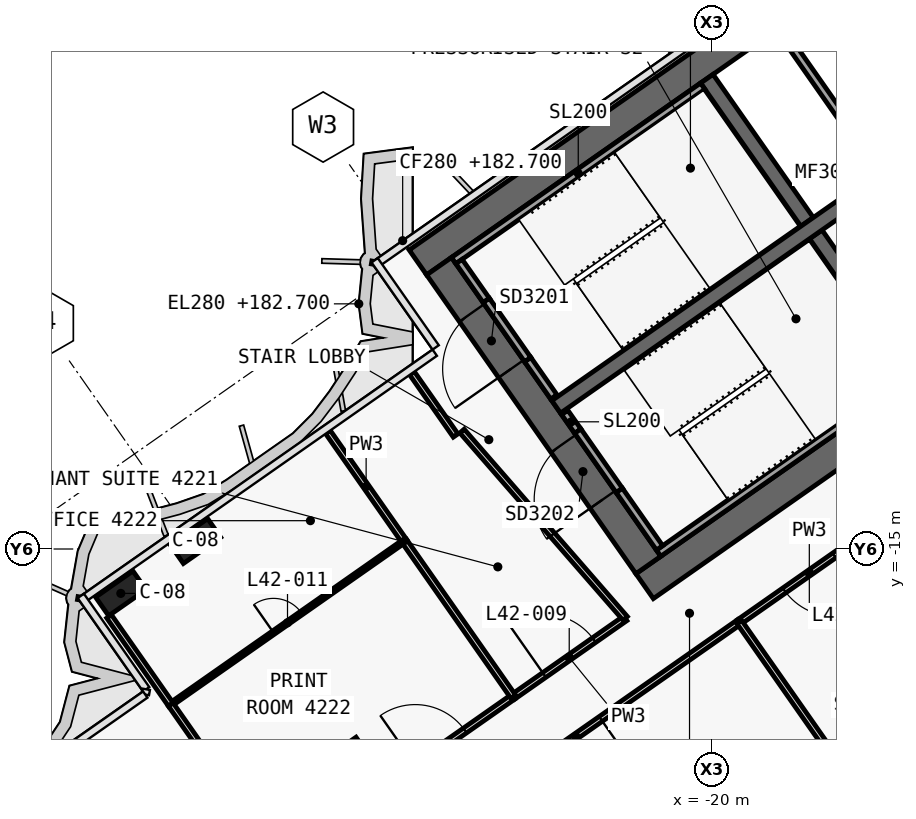
"""IFC4 building model, lengths in metres.
Left out: names, types, materials, properties, quantities, classifications, styles, units other than length and angle.
Written with IfcOpenShell. Run it as: python <this file> out.ifc"""

import sys

from ifc_helpers import new_model, si_unit, direction, frame, frame_2d, origin, origin_2d, place, context, subcontext, project, spatial, polyline, rectangle, outline, extrude, element, fill, save


model = new_model("IFC4")
c1 = context("Model", 3, precision=1e-05, world=origin(), true_north=direction((0.0, 1.0)))
c2 = subcontext(c1, "Body", "Model", "MODEL_VIEW")
j1 = project(units=[si_unit("LENGTHUNIT", "METRE"), si_unit("PLANEANGLEUNIT", "RADIAN")], contexts=[c1])
p1 = place(None, origin())
s1 = spatial("IfcSite", under=j1, at=p1, CompositionType="ELEMENT")
p2 = place(p1, origin())
s2 = spatial("IfcBuilding", under=s1, at=p2, CompositionType="ELEMENT")
p3 = place(p2, frame((0.0, 0.0, 182.7)))
s3 = spatial("IfcBuildingStorey", under=s2, at=p3, CompositionType="ELEMENT", Elevation=182.7)
p4 = place(p3, frame((0.029, 11.984, 0.0), z_axis=(0.0, 0.0, 1.0), x_axis=(-0.819151382952, -0.573577380837, 0.0)))
e1 = element("IfcWall", 1, at=p4, inside=s3, PredefinedType="SHEAR", context=c2, shape_type="SweptSolid", body=[
    extrude(outline(polyline([(33.898, 0.4), (0.56, 0.4), (-0.0, -0.4), (33.898, -0.4), (33.898, 0.4)])), origin(), (0.0, 0.0, 1.0), 3.9),
])
p5 = place(p3, frame((0.029, -0.712, 0.0), z_axis=(0.0, 0.0, 1.0), x_axis=(-0.819151758019, -0.573576845187, 0.0)))
e2 = element("IfcWall", 2, at=p5, inside=s3, PredefinedType="SHEAR", context=c2, shape_type="SweptSolid", body=[
    extrude(outline(polyline([(26.616, 0.4), (0.56, 0.4), (-0.0, -0.4), (26.616, -0.4), (26.616, 0.4)])), origin(), (0.0, 0.0, 1.0), 3.9),
])
p6 = place(p5, frame((2.966, 0.0, 0.0)))
e3 = element("IfcOpeningElement", 3, at=p6, cuts=e2, PredefinedType="OPENING", context=c2, shape_type="SweptSolid", body=[
    extrude(rectangle(XDim=2.4, YDim=2.1, at=frame_2d((1.2, 1.05))), frame((0.0, 0.41, 0.0), z_axis=(0.0, -1.0, 0.0), x_axis=(1.0, 0.0, 0.0)), (0.0, 0.0, 1.0), 0.82),
])
p7 = place(p5, frame((11.916, 0.0, 0.0)))
e4 = element("IfcOpeningElement", 4, at=p7, cuts=e2, PredefinedType="OPENING", context=c2, shape_type="SweptSolid", body=[
    extrude(rectangle(XDim=2.4, YDim=2.1, at=frame_2d((1.2, 1.05))), frame((0.0, 0.41, 0.0), z_axis=(0.0, -1.0, 0.0), x_axis=(1.0, 0.0, 0.0)), (0.0, 0.0, 1.0), 0.82),
])
p8 = place(p3, frame((-21.675, -15.421, 0.0), z_axis=(0.0, 0.0, 1.0), x_axis=(-0.573581815061, 0.819148278049, 0.0)))
e5 = element("IfcWall", 5, at=p8, inside=s3, PredefinedType="SHEAR", context=c2, shape_type="SweptSolid", body=[
    extrude(outline(polyline([(0.0, 0.4), (0.0, -0.4), (9.6, -0.4), (9.6, 0.4), (0.0, 0.4)])), origin(), (0.0, 0.0, 1.0), 3.9),
])
p9 = place(p8, frame((6.3, 0.0, 0.0)))
e6 = element("IfcOpeningElement", 6, at=p9, cuts=e5, PredefinedType="OPENING", context=c2, shape_type="SweptSolid", body=[
    extrude(rectangle(XDim=1.8, YDim=2.1, at=frame_2d((0.9, 1.05))), frame((0.0, 0.41, 0.0), z_axis=(0.0, -1.0, 0.0), x_axis=(1.0, 0.0, 0.0)), (0.0, 0.0, 1.0), 0.82),
])
p10 = place(p8, frame((2.1, 0.0, 0.0)))
e7 = element("IfcOpeningElement", 7, at=p10, cuts=e5, PredefinedType="OPENING", context=c2, shape_type="SweptSolid", body=[
    extrude(rectangle(XDim=1.8, YDim=2.1, at=frame_2d((0.9, 1.05))), frame((0.0, 0.41, 0.0), z_axis=(0.0, -1.0, 0.0), x_axis=(1.0, 0.0, 0.0)), (0.0, 0.0, 1.0), 0.82),
])
p11 = place(p3, frame((-14.63, -10.488, 0.0), z_axis=(0.0, 0.0, 1.0), x_axis=(-0.573611936273, 0.819127185829, 0.0)))
e8 = element("IfcWall", 8, at=p11, inside=s3, PredefinedType="SHEAR", context=c2, shape_type="SweptSolid", body=[
    extrude(outline(polyline([(4.6, 0.2), (0.0, 0.2), (0.0, -0.2), (4.6, -0.2), (4.6, 0.2)])), origin(), (0.0, 0.0, 1.0), 3.9),
])
p12 = place(p3, frame((-17.498, -6.392, 0.0), z_axis=(0.0, 0.0, 1.0), x_axis=(-0.573611936273, 0.819127185829, 0.0)))
e9 = element("IfcWall", 9, at=p12, inside=s3, PredefinedType="SHEAR", context=c2, shape_type="SweptSolid", body=[
    extrude(outline(polyline([(4.6, -0.2), (4.6, 0.2), (0.0, 0.2), (0.0, -0.2), (4.6, -0.2)])), origin(), (0.0, 0.0, 1.0), 3.9),
])
p13 = place(p3, frame((-2.638, 3.768, 0.0), z_axis=(0.0, 0.0, 1.0), x_axis=(-0.81915267502, -0.573575535572, 0.0)))
e10 = element("IfcWall", 10, at=p13, inside=s3, PredefinedType="SHEAR", context=c2, shape_type="SweptSolid", body=[
    extrude(outline(polyline([(26.2, 0.2), (0.0, 0.2), (0.0, -0.2), (26.2, -0.2), (26.2, 0.2)])), origin(), (0.0, 0.0, 1.0), 3.9),
])
p14 = place(p13, frame((1.169, 0.0, 0.0)))
e11 = element("IfcOpeningElement", 11, at=p14, cuts=e10, PredefinedType="OPENING", context=c2, shape_type="SweptSolid", body=[
    extrude(rectangle(XDim=1.1, YDim=2.1, at=frame_2d((0.55, 1.05))), frame((0.0, 0.21, 0.0), z_axis=(0.0, -1.0, 0.0), x_axis=(1.0, 0.0, 0.0)), (0.0, 0.0, 1.0), 0.42),
])
p15 = place(p13, frame((3.206, 0.0, 0.0)))
e12 = element("IfcOpeningElement", 12, at=p15, cuts=e10, PredefinedType="OPENING", context=c2, shape_type="SweptSolid", body=[
    extrude(rectangle(XDim=1.1, YDim=2.1, at=frame_2d((0.55, 1.05))), frame((0.0, 0.21, 0.0), z_axis=(0.0, -1.0, 0.0), x_axis=(1.0, 0.0, 0.0)), (0.0, 0.0, 1.0), 0.42),
])
p16 = place(p13, frame((5.244, 0.0, 0.0)))
e13 = element("IfcOpeningElement", 13, at=p16, cuts=e10, PredefinedType="OPENING", context=c2, shape_type="SweptSolid", body=[
    extrude(rectangle(XDim=1.1, YDim=2.1, at=frame_2d((0.55, 1.05))), frame((0.0, 0.21, 0.0), z_axis=(0.0, -1.0, 0.0), x_axis=(1.0, 0.0, 0.0)), (0.0, 0.0, 1.0), 0.42),
])
p17 = place(p13, frame((7.281, 0.0, 0.0)))
e14 = element("IfcOpeningElement", 14, at=p17, cuts=e10, PredefinedType="OPENING", context=c2, shape_type="SweptSolid", body=[
    extrude(rectangle(XDim=1.1, YDim=2.1, at=frame_2d((0.55, 1.05))), frame((0.0, 0.21, 0.0), z_axis=(0.0, -1.0, 0.0), x_axis=(1.0, 0.0, 0.0)), (0.0, 0.0, 1.0), 0.42),
])
p18 = place(p13, frame((9.688, 0.0, 0.0)))
e15 = element("IfcOpeningElement", 15, at=p18, cuts=e10, PredefinedType="OPENING", context=c2, shape_type="SweptSolid", body=[
    extrude(rectangle(XDim=1.1, YDim=2.1, at=frame_2d((0.55, 1.05))), frame((0.0, 0.21, 0.0), z_axis=(0.0, -1.0, 0.0), x_axis=(1.0, 0.0, 0.0)), (0.0, 0.0, 1.0), 0.42),
])
p19 = place(p13, frame((11.863, 0.0, 0.0)))
e16 = element("IfcOpeningElement", 16, at=p19, cuts=e10, PredefinedType="OPENING", context=c2, shape_type="SweptSolid", body=[
    extrude(rectangle(XDim=1.1, YDim=2.1, at=frame_2d((0.55, 1.05))), frame((0.0, 0.21, 0.0), z_axis=(0.0, -1.0, 0.0), x_axis=(1.0, 0.0, 0.0)), (0.0, 0.0, 1.0), 0.42),
])
for number, where, z_axis, x_axis in (
    (17, (-33.591, -14.792, 0.0), (0.0, 0.0, 1.0), (-0.819, -0.574, 0.0)),
    (18, (-35.556, -16.168, 0.0), (0.0, 0.0, 1.0), (-0.819, -0.574, 0.0)),
):
    element("IfcColumn", number, at=place(p3, frame(where, z_axis=z_axis, x_axis=x_axis)), inside=s3, PredefinedType="COLUMN", context=c2, shape_type="SweptSolid", body=[
        extrude(rectangle(XDim=1.2, YDim=0.6, at=origin_2d()), origin(), (0.0, 0.0, 1.0), 3.9),
    ])
p20 = place(p3, frame((-29.49, -20.649, 0.0), z_axis=(0.0, 0.0, 1.0), x_axis=(-0.819152044289, -0.573576436351, 0.0)))
e19 = element("IfcColumn", 19, at=p20, inside=s3, PredefinedType="COLUMN", context=c2, shape_type="SweptSolid", body=[
    extrude(rectangle(XDim=1.0, YDim=1.0, at=origin_2d()), origin(), (0.0, 0.0, 1.0), 3.9),
])
p21 = place(p3, frame((-15.594, -5.059, 0.0), z_axis=(0.0, 0.0, 1.0), x_axis=(-0.573540709186, 0.819177059558, 0.0)))
e20 = element("IfcWall", 20, at=p21, inside=s3, PredefinedType="SOLIDWALL", context=c2, shape_type="SweptSolid", body=[
    extrude(rectangle(XDim=4.6, YDim=0.2, at=frame_2d((2.3, 0.0))), origin(), (0.0, 0.0, 1.0), 3.62),
])
p22 = place(p3, frame((-20.243, -2.821, 0.0), z_axis=(0.0, 0.0, 1.0), x_axis=(-0.819141584393, -0.57359137434, 0.0)))
e21 = element("IfcWall", 21, at=p22, inside=s3, PredefinedType="SOLIDWALL", context=c2, shape_type="SweptSolid", body=[
    extrude(rectangle(XDim=8.0, YDim=0.2, at=frame_2d((4.0, 0.0))), origin(), (0.0, 0.0, 1.0), 3.62),
])
p23 = place(p3, frame((-24.162, -10.998, 0.0), z_axis=(0.0, 0.0, 1.0), x_axis=(-0.573612502218, 0.819126789514, 0.0)))
e22 = element("IfcWall", 22, at=p23, inside=s3, PredefinedType="SOLIDWALL", context=c2, shape_type="SweptSolid", body=[
    extrude(rectangle(XDim=1.2, YDim=0.2, at=frame_2d((0.6, 0.0))), origin(), (0.0, 0.0, 1.0), 3.62),
])
p24 = place(p3, frame((-25.94, -8.458, 0.0), z_axis=(0.0, 0.0, 1.0), x_axis=(-0.573619628835, 0.819121798889, 0.0)))
e23 = element("IfcWall", 23, at=p24, inside=s3, PredefinedType="SOLIDWALL", context=c2, shape_type="SweptSolid", body=[
    extrude(rectangle(XDim=1.25, YDim=0.2, at=frame_2d((0.625, 0.0))), origin(), (0.0, 0.0, 1.0), 3.62),
])
p25 = place(p3, frame((-24.85, -10.014, 2.15), z_axis=(0.0, 0.0, 1.0), x_axis=(-0.573505465124, 0.819201734296, 0.0)))
e24 = element("IfcWall", 24, at=p25, inside=s3, PredefinedType="SOLIDWALL", context=c2, shape_type="SweptSolid", body=[
    extrude(rectangle(XDim=1.9, YDim=0.2, at=frame_2d((0.95, 0.0))), origin(), (0.0, 0.0, 1.0), 1.47),
])
p26 = place(p3, frame((-14.851, -10.521, 0.0), z_axis=(0.0, 0.0, 1.0), x_axis=(-0.819141584393, -0.57359137434, 0.0)))
e25 = element("IfcWall", 25, at=p26, inside=s3, PredefinedType="SOLIDWALL", context=c2, shape_type="SweptSolid", body=[
    extrude(rectangle(XDim=8.0, YDim=0.2, at=frame_2d((4.0, 0.0))), origin(), (0.0, 0.0, 1.0), 3.62),
])
p27 = place(p3, frame((-21.38, -14.97, 0.0), z_axis=(0.0, 0.0, 1.0), x_axis=(-0.573559770908, 0.819163713305, 0.0)))
e26 = element("IfcWall", 26, at=p27, inside=s3, PredefinedType="SOLIDWALL", context=c2, shape_type="SweptSolid", body=[
    extrude(rectangle(XDim=1.85, YDim=0.2, at=frame_2d((0.925, 0.0))), origin(), (0.0, 0.0, 1.0), 3.62),
])
p28 = place(p3, frame((-23.531, -11.898, 0.0), z_axis=(0.0, 0.0, 1.0), x_axis=(-0.573708088123, 0.819059844958, 0.0)))
e27 = element("IfcWall", 27, at=p28, inside=s3, PredefinedType="SOLIDWALL", context=c2, shape_type="SweptSolid", body=[
    extrude(rectangle(XDim=0.6, YDim=0.2, at=frame_2d((0.3, 0.0))), origin(), (0.0, 0.0, 1.0), 3.62),
])
p29 = place(p3, frame((-22.441, -13.455, 2.15), z_axis=(0.0, 0.0, 1.0), x_axis=(-0.573591692345, 0.819141361715, 0.0)))
e28 = element("IfcWall", 28, at=p29, inside=s3, PredefinedType="SOLIDWALL", context=c2, shape_type="SweptSolid", body=[
    extrude(rectangle(XDim=1.9, YDim=0.2, at=frame_2d((0.95, 0.0))), origin(), (0.0, 0.0, 1.0), 1.47),
])
p30 = place(p3, frame((-25.231, -18.888, 0.0), z_axis=(0.0, 0.0, 1.0), x_axis=(0.819152236293, 0.573576162141, 0.0)))
e29 = element("IfcWall", 29, at=p30, inside=s3, PredefinedType="PARTITIONING", context=c2, shape_type="SweptSolid", body=[
    extrude(rectangle(XDim=3.599, YDim=0.15, at=frame_2d((1.799, 0.0))), origin(), (0.0, 0.0, 1.0), 3.0),
])
p31 = place(p30, frame((1.0, 0.0, 0.0)))
e30 = element("IfcOpeningElement", 30, at=p31, cuts=e29, PredefinedType="OPENING", context=c2, shape_type="SweptSolid", body=[
    extrude(rectangle(XDim=1.6, YDim=2.1, at=frame_2d((0.8, 1.05))), frame((0.0, 0.085, 0.0), z_axis=(0.0, -1.0, 0.0), x_axis=(1.0, 0.0, 0.0)), (0.0, 0.0, 1.0), 0.17),
])
p32 = place(p3, frame((-31.375, -23.19, 0.0), z_axis=(0.0, 0.0, 1.0), x_axis=(0.819153958035, 0.573573703229, 0.0)))
e31 = element("IfcWall", 31, at=p32, inside=s3, PredefinedType="PARTITIONING", context=c2, shape_type="SweptSolid", body=[
    extrude(rectangle(XDim=7.504, YDim=0.15, at=frame_2d((3.752, 0.0))), origin(), (0.0, 0.0, 1.0), 3.0),
])
p33 = place(p32, frame((4.352, 0.0, 0.0)))
e32 = element("IfcOpeningElement", 32, at=p33, cuts=e31, PredefinedType="OPENING", context=c2, shape_type="SweptSolid", body=[
    extrude(rectangle(XDim=1.6, YDim=2.1, at=frame_2d((0.8, 1.05))), frame((0.0, 0.085, 0.0), z_axis=(0.0, -1.0, 0.0), x_axis=(1.0, 0.0, 0.0)), (0.0, 0.0, 1.0), 0.17),
])
p34 = place(p3, frame((-15.594, -14.338, 0.0), z_axis=(0.0, 0.0, 1.0), x_axis=(-0.819165703328, -0.573556928727, 0.0)))
e33 = element("IfcWall", 33, at=p34, inside=s3, PredefinedType="PARTITIONING", context=c2, shape_type="SweptSolid", body=[
    extrude(rectangle(XDim=4.504, YDim=0.15, at=frame_2d((2.252, 0.0))), origin(), (0.0, 0.0, 1.0), 3.62),
])
p35 = place(p34, frame((1.452, 0.0, 0.0)))
e34 = element("IfcOpeningElement", 34, at=p35, cuts=e33, PredefinedType="OPENING", context=c2, shape_type="SweptSolid", body=[
    extrude(rectangle(XDim=1.6, YDim=2.1, at=frame_2d((0.8, 1.05))), frame((0.0, 0.085, 0.0), z_axis=(0.0, -1.0, 0.0), x_axis=(1.0, 0.0, 0.0)), (0.0, 0.0, 1.0), 0.17),
])
p36 = place(p3, frame((-19.281, -16.919, 0.0), z_axis=(0.0, 0.0, 1.0), x_axis=(-0.819145647741, -0.57358557146, 0.0)))
e35 = element("IfcWall", 35, at=p36, inside=s3, PredefinedType="PARTITIONING", context=c2, shape_type="SweptSolid", body=[
    extrude(rectangle(XDim=10.504, YDim=0.15, at=frame_2d((5.252, 0.0))), origin(), (0.0, 0.0, 1.0), 3.0),
])
p37 = place(p36, frame((4.452, 0.0, 0.0)))
e36 = element("IfcOpeningElement", 36, at=p37, cuts=e35, PredefinedType="OPENING", context=c2, shape_type="SweptSolid", body=[
    extrude(rectangle(XDim=1.6, YDim=2.1, at=frame_2d((0.8, 1.05))), frame((0.0, 0.085, 0.0), z_axis=(0.0, -1.0, 0.0), x_axis=(1.0, 0.0, 0.0)), (0.0, 0.0, 1.0), 0.17),
])
p38 = place(p3, frame((-26.746, -12.014, 0.0), z_axis=(0.0, 0.0, 1.0), x_axis=(-0.573568836472, 0.819157365729, 0.0)))
e37 = element("IfcWall", 37, at=p38, inside=s3, PredefinedType="PARTITIONING", context=c2, shape_type="SweptSolid", body=[
    extrude(rectangle(XDim=2.0, YDim=0.15, at=frame_2d((1.0, 0.0))), origin(), (0.0, 0.0, 1.0), 3.0),
])
p39 = place(p3, frame((-22.284, -16.826, 0.0), z_axis=(0.0, 0.0, 1.0), x_axis=(-0.656758142177, 0.754101281449, 0.0)))
e38 = element("IfcWall", 38, at=p39, inside=s3, PredefinedType="PARTITIONING", context=c2, shape_type="SweptSolid", body=[
    extrude(rectangle(XDim=6.539, YDim=0.15, at=frame_2d((3.269, 0.0))), origin(), (0.0, 0.0, 1.0), 3.0),
])
p40 = place(p3, frame((-28.097, -14.792, 0.0), z_axis=(0.0, 0.0, 1.0), x_axis=(-0.573560622794, 0.819163116834, 0.0)))
e39 = element("IfcWall", 39, at=p40, inside=s3, PredefinedType="PARTITIONING", context=c2, shape_type="SweptSolid", body=[
    extrude(rectangle(XDim=3.501, YDim=0.15, at=frame_2d((1.75, 0.0))), origin(), (0.0, 0.0, 1.0), 3.0),
])
p41 = place(p3, frame((-25.23, -18.887, 0.0), z_axis=(0.0, 0.0, 1.0), x_axis=(-0.573557338351, 0.819165416521, 0.0)))
e40 = element("IfcWall", 40, at=p41, inside=s3, PredefinedType="PARTITIONING", context=c2, shape_type="SweptSolid", body=[
    extrude(rectangle(XDim=5.002, YDim=0.15, at=frame_2d((2.501, 0.0))), origin(), (0.0, 0.0, 1.0), 3.0),
])
p42 = place(p3, frame((-34.242, -19.092, 0.0), z_axis=(0.0, 0.0, 1.0), x_axis=(0.81915238829, 0.573575945067, 0.0)))
e41 = element("IfcWall", 41, at=p42, inside=s3, PredefinedType="PARTITIONING", context=c2, shape_type="SweptSolid", body=[
    extrude(rectangle(XDim=7.5, YDim=0.1, at=frame_2d((3.75, 0.0))), origin(), (0.0, 0.0, 1.0), 3.0),
])
p43 = place(p42, frame((3.3, 0.0, 0.0)))
e42 = element("IfcOpeningElement", 42, at=p43, cuts=e41, PredefinedType="OPENING", context=c2, shape_type="SweptSolid", body=[
    extrude(rectangle(XDim=0.9, YDim=2.1, at=frame_2d((0.45, 1.05))), frame((0.0, 0.06, 0.0), z_axis=(0.0, -1.0, 0.0), x_axis=(1.0, 0.0, 0.0)), (0.0, 0.0, 1.0), 0.12),
])
p44 = place(p3, frame((-34.242, -19.092, 0.0), z_axis=(0.0, 0.0, 1.0), x_axis=(-0.573612919194, 0.819126497516, 0.0)))
e43 = element("IfcWall", 43, at=p44, inside=s3, PredefinedType="PARTITIONING", context=c2, shape_type="SweptSolid", body=[
    extrude(rectangle(XDim=2.829, YDim=0.15, at=frame_2d((1.415, 0.0))), origin(), (0.0, 0.0, 1.0), 2.9),
])
p45 = place(p3, frame((-31.373, -23.189, 0.0), z_axis=(0.0, 0.0, 1.0), x_axis=(-0.573586866468, 0.819144740944, 0.0)))
e44 = element("IfcWall", 44, at=p45, inside=s3, PredefinedType="PARTITIONING", context=c2, shape_type="SweptSolid", body=[
    extrude(rectangle(XDim=5.0, YDim=0.15, at=frame_2d((2.5, 0.0))), origin(), (0.0, 0.0, 1.0), 3.0),
])
p46 = place(p3, frame((-16.413, -21.017, 0.0), z_axis=(0.0, 0.0, 1.0), x_axis=(-0.573613022702, 0.819126425033, 0.0)))
e45 = element("IfcWall", 45, at=p46, inside=s3, PredefinedType="PARTITIONING", context=c2, shape_type="SweptSolid", body=[
    extrude(rectangle(XDim=5.002, YDim=0.15, at=frame_2d((2.501, 0.0))), origin(), (0.0, 0.0, 1.0), 3.62),
])
p47 = place(p9, origin())
e46 = element("IfcDoor", 46, at=p47, inside=s3, OperationType="DOUBLE_DOOR_SINGLE_SWING", PredefinedType="DOOR", context=c2, shape_type="SweptSolid", body=[
    extrude(rectangle(XDim=1.8, YDim=2.1, at=frame_2d((0.9, 1.05))), frame((0.0, 0.025, 0.0), z_axis=(0.0, -1.0, 0.0), x_axis=(1.0, 0.0, 0.0)), (0.0, 0.0, 1.0), 0.05),
])
fill(e6, e46)
p48 = place(p10, origin())
e47 = element("IfcDoor", 47, at=p48, inside=s3, OperationType="DOUBLE_DOOR_SINGLE_SWING", PredefinedType="DOOR", context=c2, shape_type="SweptSolid", body=[
    extrude(rectangle(XDim=1.8, YDim=2.1, at=frame_2d((0.9, 1.05))), frame((0.0, 0.025, 0.0), z_axis=(0.0, -1.0, 0.0), x_axis=(1.0, 0.0, 0.0)), (0.0, 0.0, 1.0), 0.05),
])
fill(e7, e47)
p49 = place(p35, origin())
e48 = element("IfcDoor", 48, at=p49, inside=s3, OperationType="DOUBLE_DOOR_SINGLE_SWING", PredefinedType="DOOR", context=c2, shape_type="SweptSolid", body=[
    extrude(rectangle(XDim=1.6, YDim=2.1, at=frame_2d((0.8, 1.05))), frame((0.0, 0.025, 0.0), z_axis=(0.0, -1.0, 0.0), x_axis=(1.0, 0.0, 0.0)), (0.0, 0.0, 1.0), 0.05),
])
fill(e34, e48)
p50 = place(p37, origin())
e49 = element("IfcDoor", 49, at=p50, inside=s3, OperationType="DOUBLE_DOOR_SINGLE_SWING", PredefinedType="DOOR", context=c2, shape_type="SweptSolid", body=[
    extrude(rectangle(XDim=1.6, YDim=2.1, at=frame_2d((0.8, 1.05))), frame((0.0, 0.025, 0.0), z_axis=(0.0, -1.0, 0.0), x_axis=(1.0, 0.0, 0.0)), (0.0, 0.0, 1.0), 0.05),
])
fill(e36, e49)
p51 = place(p31, origin())
e50 = element("IfcDoor", 50, at=p51, inside=s3, OperationType="DOUBLE_DOOR_SINGLE_SWING", PredefinedType="DOOR", context=c2, shape_type="SweptSolid", body=[
    extrude(rectangle(XDim=1.6, YDim=2.1, at=frame_2d((0.8, 1.05))), frame((0.0, 0.025, 0.0), z_axis=(0.0, -1.0, 0.0), x_axis=(1.0, 0.0, 0.0)), (0.0, 0.0, 1.0), 0.05),
])
fill(e30, e50)
p52 = place(p33, origin())
e51 = element("IfcDoor", 51, at=p52, inside=s3, OperationType="DOUBLE_DOOR_SINGLE_SWING", PredefinedType="DOOR", context=c2, shape_type="SweptSolid", body=[
    extrude(rectangle(XDim=1.6, YDim=2.1, at=frame_2d((0.8, 1.05))), frame((0.0, 0.025, 0.0), z_axis=(0.0, -1.0, 0.0), x_axis=(1.0, 0.0, 0.0)), (0.0, 0.0, 1.0), 0.05),
])
fill(e32, e51)
p53 = place(p43, origin())
e52 = element("IfcDoor", 52, at=p53, inside=s3, OperationType="SINGLE_SWING_LEFT", PredefinedType="DOOR", context=c2, shape_type="SweptSolid", body=[
    extrude(rectangle(XDim=0.9, YDim=2.1, at=frame_2d((0.45, 1.05))), frame((0.0, 0.025, 0.0), z_axis=(0.0, -1.0, 0.0), x_axis=(1.0, 0.0, 0.0)), (0.0, 0.0, 1.0), 0.05),
])
fill(e42, e52)
save(model, sys.argv[1])
